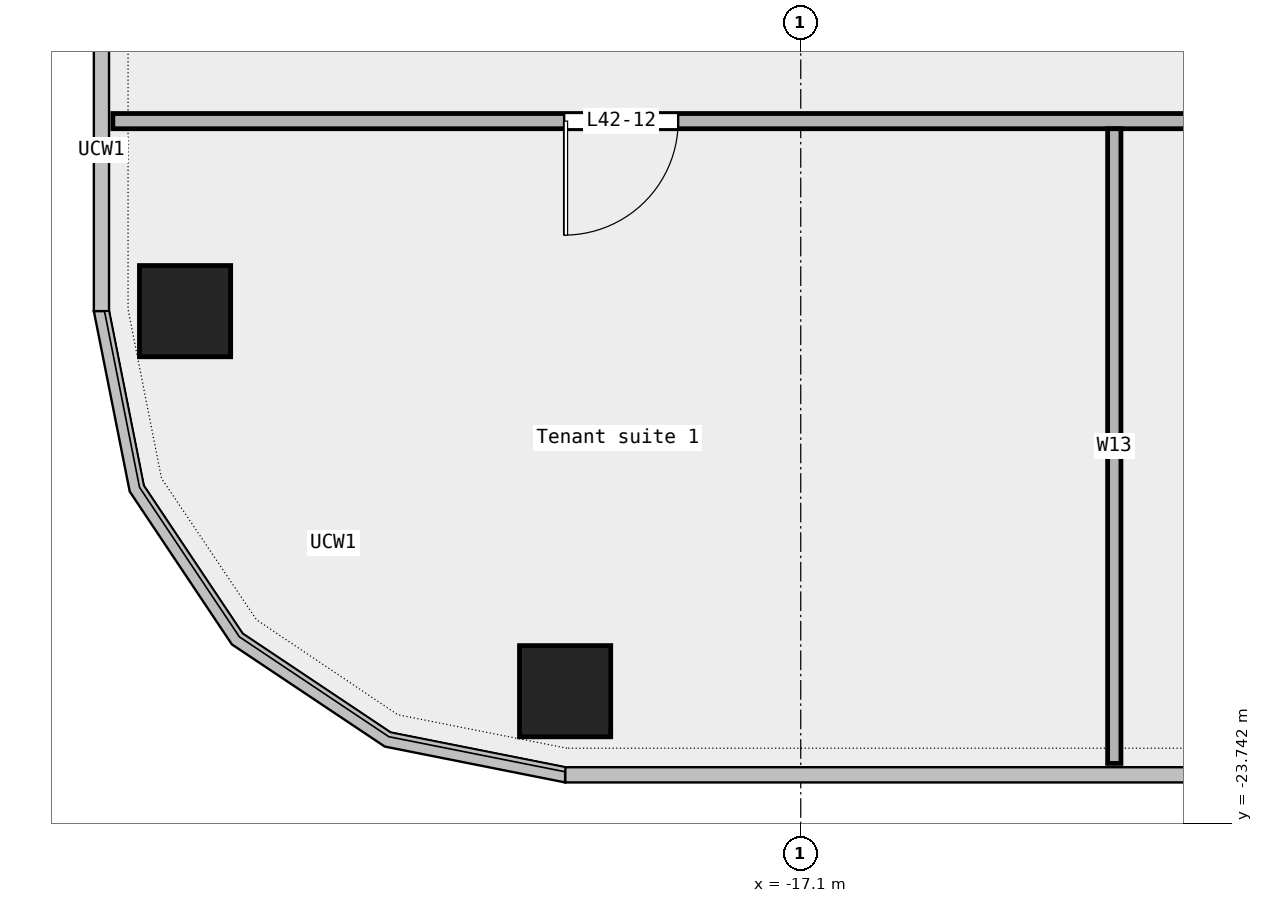
"""IFC4 building model, lengths in metres.
Left out: names, types, materials, properties, quantities, classifications, styles, units other than length and angle.
Written with IfcOpenShell. Run it as: python <this file> out.ifc"""

import sys

from ifc_helpers import new_model, si_unit, direction, frame, frame_2d, origin, origin_2d, place, context, subcontext, project, spatial, rectangle, extrude, element, fill, save


model = new_model("IFC4")
c1 = context("Model", 3, precision=1e-05, world=origin(), true_north=direction((0.0, 1.0)))
c2 = subcontext(c1, "Body", "Model", "MODEL_VIEW")
j1 = project(units=[si_unit("LENGTHUNIT", "METRE"), si_unit("PLANEANGLEUNIT", "RADIAN")], contexts=[c1])
p1 = place(None, origin())
s1 = spatial("IfcSite", under=j1, at=p1, CompositionType="ELEMENT")
p2 = place(p1, origin())
s2 = spatial("IfcBuilding", under=s1, at=p2, CompositionType="ELEMENT")
p3 = place(p2, frame((0.0, 0.0, 201.0)))
s3 = spatial("IfcBuildingStorey", under=s2, at=p3, CompositionType="ELEMENT", Elevation=201.0)
for number, where, z_axis, x_axis in (
    (1, (-20.2, -22.0, 0.0), (0.0, 0.0, 1.0), (1.0, 0.0, 0.0)),
    (2, (-25.2, -17.0, 0.0), (0.0, 0.0, 1.0), (1.0, 0.0, 0.0)),
):
    element("IfcColumn", number, at=place(p3, frame(where, z_axis=z_axis, x_axis=x_axis)), inside=s3, PredefinedType="COLUMN", context=c2, shape_type="SweptSolid", body=[
        extrude(rectangle(XDim=1.2, YDim=1.2, at=origin_2d()), origin(), (0.0, 0.0, 1.0), 3.4),
    ])
p4 = place(p3, frame((-26.15, -14.5, 0.0), z_axis=(0.0, 0.0, 1.0), x_axis=(1.0, 0.0, 0.0)))
e3 = element("IfcWall", 3, at=p4, inside=s3, PredefinedType="PARTITIONING", context=c2, shape_type="SweptSolid", body=[
    extrude(rectangle(XDim=52.3, YDim=0.2, at=frame_2d((26.15, 0.0))), origin(), (0.0, 0.0, 1.0), 3.4),
])
p5 = place(p4, frame((46.38, 0.0, 0.0)))
e4 = element("IfcOpeningElement", 4, at=p5, cuts=e3, PredefinedType="OPENING", context=c2, shape_type="SweptSolid", body=[
    extrude(rectangle(XDim=1.2, YDim=2.1, at=frame_2d((0.6, 1.05))), frame((0.0, 0.112, 0.0), z_axis=(0.0, -1.0, 0.0), x_axis=(1.0, 0.0, 0.0)), (0.0, 0.0, 1.0), 0.224),
])
p6 = place(p4, frame((5.938, 0.0, 0.0)))
e5 = element("IfcOpeningElement", 5, at=p6, cuts=e3, PredefinedType="OPENING", context=c2, shape_type="SweptSolid", body=[
    extrude(rectangle(XDim=1.5, YDim=2.1, at=frame_2d((0.75, 1.05))), frame((0.0, 0.112, 0.0), z_axis=(0.0, -1.0, 0.0), x_axis=(1.0, 0.0, 0.0)), (0.0, 0.0, 1.0), 0.224),
])
p7 = place(p4, frame((20.035, 0.0, 0.0)))
e6 = element("IfcOpeningElement", 6, at=p7, cuts=e3, PredefinedType="OPENING", context=c2, shape_type="SweptSolid", body=[
    extrude(rectangle(XDim=1.5, YDim=2.1, at=frame_2d((0.75, 1.05))), frame((0.0, 0.112, 0.0), z_axis=(0.0, -1.0, 0.0), x_axis=(1.0, 0.0, 0.0)), (0.0, 0.0, 1.0), 0.224),
])
p8 = place(p4, frame((34.528, 0.0, 0.0)))
e7 = element("IfcOpeningElement", 7, at=p8, cuts=e3, PredefinedType="OPENING", context=c2, shape_type="SweptSolid", body=[
    extrude(rectangle(XDim=1.2, YDim=2.1, at=frame_2d((0.6, 1.05))), frame((0.0, 0.112, 0.0), z_axis=(0.0, -1.0, 0.0), x_axis=(1.0, 0.0, 0.0)), (0.0, 0.0, 1.0), 0.224),
])
p9 = place(p3, frame((-12.975, -22.95, 0.0), z_axis=(0.0, 0.0, 1.0), x_axis=(0.0, 1.0, 0.0)))
e8 = element("IfcWall", 8, at=p9, inside=s3, PredefinedType="PARTITIONING", context=c2, shape_type="SweptSolid", body=[
    extrude(rectangle(XDim=8.35, YDim=0.175, at=frame_2d((4.175, 0.0))), origin(), (0.0, 0.0, 1.0), 3.4),
])
p10 = place(p6, origin())
e9 = element("IfcDoor", 9, at=p10, inside=s3, OperationType="DOUBLE_DOOR_SINGLE_SWING", PredefinedType="DOOR", context=c2, shape_type="SweptSolid", body=[
    extrude(rectangle(XDim=1.5, YDim=2.1, at=frame_2d((0.75, 1.05))), frame((0.0, 0.025, 0.0), z_axis=(0.0, -1.0, 0.0), x_axis=(1.0, 0.0, 0.0)), (0.0, 0.0, 1.0), 0.05),
])
fill(e5, e9)
save(model, sys.argv[1])
